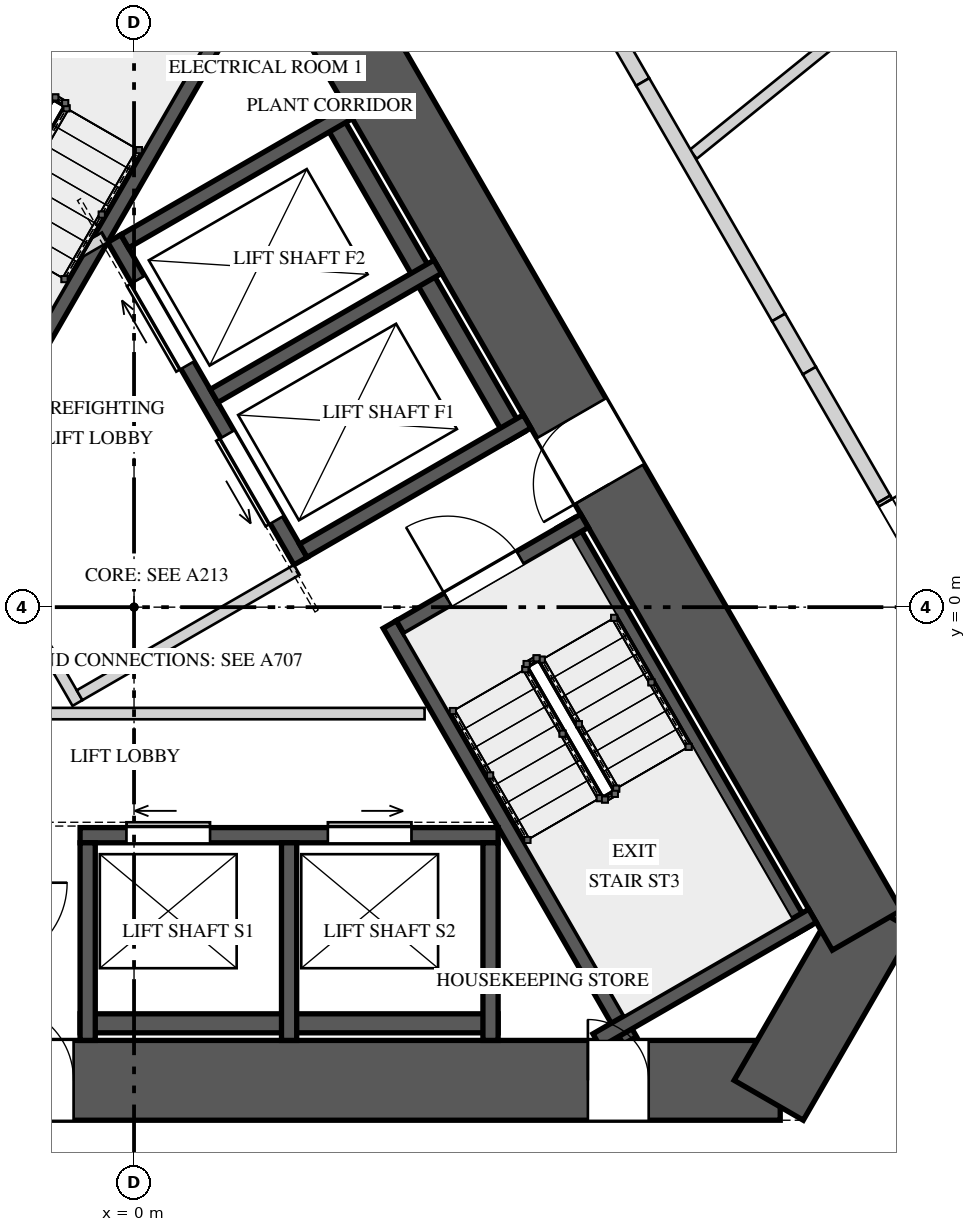
"""IFC4 building model, lengths in metres.
Left out: names, types, materials, properties, quantities, classifications, styles, units other than length and angle.
Written with IfcOpenShell. Run it as: python <this file> out.ifc"""

import sys

from ifc_helpers import new_model, si_unit, direction, frame, frame_2d, origin, place, context, subcontext, project, spatial, polyline, rectangle, outline, extrude, element, fill, save


model = new_model("IFC4")
c1 = context("Model", 3, precision=1e-05, world=origin(), true_north=direction((0.0, 1.0)))
c2 = subcontext(c1, "Body", "Model", "MODEL_VIEW")
j1 = project(units=[si_unit("LENGTHUNIT", "METRE"), si_unit("PLANEANGLEUNIT", "RADIAN")], contexts=[c1])
p1 = place(None, origin())
s1 = spatial("IfcSite", under=j1, at=p1, CompositionType="ELEMENT")
p2 = place(p1, origin())
s2 = spatial("IfcBuilding", under=s1, at=p2, CompositionType="ELEMENT")
p3 = place(p2, frame((0.0, 0.0, 83.2)))
s3 = spatial("IfcBuildingStorey", under=s2, at=p3, CompositionType="ELEMENT", Elevation=83.2)
p4 = place(p3, frame((-1.14, 10.475, 0.0), z_axis=(0.0, 0.0, 1.0), x_axis=(-0.499985955615, -0.866033512162, 0.0)))
e1 = element("IfcWall", 1, at=p4, inside=s3, PredefinedType="SHEAR", context=c2, shape_type="SweptSolid", body=[
    extrude(rectangle(XDim=17.003, YDim=1.05, at=frame_2d((8.501, 0.0))), origin(), (0.0, 0.0, 1.0), 5.2),
])
p5 = place(p4, frame((6.707, 0.0, 0.0)))
e2 = element("IfcOpeningElement", 2, at=p5, cuts=e1, PredefinedType="OPENING", context=c2, shape_type="SweptSolid", body=[
    extrude(rectangle(XDim=1.0, YDim=2.4, at=frame_2d((0.5, 1.2))), frame((0.0, 0.535, 0.0), z_axis=(0.0, -1.0, 0.0), x_axis=(1.0, 0.0, 0.0)), (0.0, 0.0, 1.0), 1.07),
])
p6 = place(p3, frame((-8.501, -6.225, 0.0), z_axis=(0.0, 0.0, 1.0), x_axis=(1.0, 0.0, 0.0)))
e3 = element("IfcWall", 3, at=p6, inside=s3, PredefinedType="SHEAR", context=c2, shape_type="SweptSolid", body=[
    extrude(rectangle(XDim=17.003, YDim=1.05, at=frame_2d((8.501, 0.0))), origin(), (0.0, 0.0, 1.0), 5.2),
])
p7 = place(p6, frame((6.707, 0.0, 0.0)))
e4 = element("IfcOpeningElement", 4, at=p7, cuts=e3, PredefinedType="OPENING", context=c2, shape_type="SweptSolid", body=[
    extrude(rectangle(XDim=1.0, YDim=2.4, at=frame_2d((0.5, 1.2))), frame((0.0, 0.535, 0.0), z_axis=(0.0, -1.0, 0.0), x_axis=(1.0, 0.0, 0.0)), (0.0, 0.0, 1.0), 1.07),
])
p8 = place(p6, frame((14.472, 0.0, 0.0)))
e5 = element("IfcOpeningElement", 5, at=p8, cuts=e3, PredefinedType="OPENING", context=c2, shape_type="SweptSolid", body=[
    extrude(rectangle(XDim=0.8, YDim=2.1, at=frame_2d((0.4, 1.05))), frame((0.0, 0.535, 0.0), z_axis=(0.0, -1.0, 0.0), x_axis=(1.0, 0.0, 0.0)), (0.0, 0.0, 1.0), 1.07),
])
p9 = place(p3, frame((8.35, -6.488, 0.0), z_axis=(0.0, 0.0, 1.0), x_axis=(0.499995765644, 0.866027848477, 0.0)))
e6 = element("IfcWall", 6, at=p9, inside=s3, PredefinedType="SHEAR", context=c2, shape_type="SweptSolid", body=[
    extrude(rectangle(XDim=2.887, YDim=1.05, at=frame_2d((1.443, 0.0))), origin(), (0.0, 0.0, 1.0), 5.2),
])
p10 = place(p3, frame((9.642, -4.25, 0.0), z_axis=(0.0, 0.0, 1.0), x_axis=(-0.499985955615, 0.866033512162, 0.0)))
e7 = element("IfcWall", 7, at=p10, inside=s3, PredefinedType="SHEAR", context=c2, shape_type="SweptSolid", body=[
    extrude(rectangle(XDim=17.003, YDim=1.05, at=frame_2d((8.501, 0.0))), origin(), (0.0, 0.0, 1.0), 5.2),
])
p11 = place(p10, frame((6.776, 0.0, 0.0)))
e8 = element("IfcOpeningElement", 8, at=p11, cuts=e7, PredefinedType="OPENING", context=c2, shape_type="SweptSolid", body=[
    extrude(rectangle(XDim=1.0, YDim=2.4, at=frame_2d((0.5, 1.2))), frame((0.0, 0.535, 0.0), z_axis=(0.0, -1.0, 0.0), x_axis=(1.0, 0.0, 0.0)), (0.0, 0.0, 1.0), 1.07),
])
p12 = place(p10, frame((13.967, 0.0, 0.0)))
e9 = element("IfcOpeningElement", 9, at=p12, cuts=e7, PredefinedType="OPENING", context=c2, shape_type="SweptSolid", body=[
    extrude(rectangle(XDim=0.8, YDim=2.1, at=frame_2d((0.4, 1.05))), frame((0.0, 0.535, 0.0), z_axis=(0.0, -1.0, 0.0), x_axis=(1.0, 0.0, 0.0)), (0.0, 0.0, 1.0), 1.07),
])
p13 = place(p3, frame((-0.701, 9.735, 0.0), z_axis=(0.0, 0.0, 1.0), x_axis=(-0.500026960575, -0.86600983753, 0.0)))
e10 = element("IfcWall", 10, at=p13, inside=s3, PredefinedType="SOLIDWALL", context=c2, shape_type="SweptSolid", body=[
    extrude(rectangle(XDim=6.2, YDim=0.25, at=frame_2d((3.1, 0.0))), origin(), (0.0, 0.0, 1.0), 4.85),
])
p14 = place(p3, frame((1.674, 8.5, 0.0), z_axis=(0.0, 0.0, 1.0), x_axis=(-0.499995607161, -0.866027939976, 0.0)))
e11 = element("IfcWall", 11, at=p14, inside=s3, PredefinedType="SOLIDWALL", context=c2, shape_type="SweptSolid", body=[
    extrude(rectangle(XDim=6.318, YDim=0.2, at=frame_2d((3.159, 0.0))), origin(), (0.0, 0.0, 1.0), 4.85),
])
p15 = place(p3, frame((8.781, -4.26, 0.0), z_axis=(0.0, 0.0, 1.0), x_axis=(-0.500009909098, 0.866019682689, 0.0)))
e12 = element("IfcWall", 12, at=p15, inside=s3, PredefinedType="SOLIDWALL", context=c2, shape_type="SweptSolid", body=[
    extrude(rectangle(XDim=6.2, YDim=0.25, at=frame_2d((3.1, 0.0))), origin(), (0.0, 0.0, 1.0), 4.85),
])
p16 = place(p3, frame((6.524, -5.7, 0.0), z_axis=(0.0, 0.0, 1.0), x_axis=(-0.499995607161, 0.866027939976, 0.0)))
e13 = element("IfcWall", 13, at=p16, inside=s3, PredefinedType="SOLIDWALL", context=c2, shape_type="SweptSolid", body=[
    extrude(rectangle(XDim=6.318, YDim=0.2, at=frame_2d((3.159, 0.0))), origin(), (0.0, 0.0, 1.0), 4.85),
])
p17 = place(p3, frame((6.087, -5.7, 0.0), z_axis=(0.0, 0.0, 1.0), x_axis=(0.866006986733, 0.500031897912, 0.0)))
e14 = element("IfcWall", 14, at=p17, inside=s3, PredefinedType="SOLIDWALL", context=c2, shape_type="SweptSolid", body=[
    extrude(rectangle(XDim=3.278, YDim=0.2, at=frame_2d((1.639, 0.0))), origin(), (0.0, 0.0, 1.0), 4.85),
])
p18 = place(p3, frame((3.501, -0.265, 0.0), z_axis=(0.0, 0.0, 1.0), x_axis=(0.866034573852, 0.49998411664, 0.0)))
e15 = element("IfcWall", 15, at=p18, inside=s3, PredefinedType="SOLIDWALL", context=c2, shape_type="SweptSolid", body=[
    extrude(rectangle(XDim=2.8, YDim=0.2, at=frame_2d((1.4, 0.0))), origin(), (0.0, 0.0, 1.0), 4.85),
])
p19 = place(p18, frame((0.725, 0.0, 0.0)))
e16 = element("IfcOpeningElement", 16, at=p19, cuts=e15, PredefinedType="OPENING", context=c2, shape_type="SweptSolid", body=[
    extrude(rectangle(XDim=1.1, YDim=2.4, at=frame_2d((0.55, 1.2))), frame((0.0, 0.11, 0.0), z_axis=(0.0, -1.0, 0.0), x_axis=(1.0, 0.0, 0.0)), (0.0, 0.0, 1.0), 0.22),
])
p20 = place(p3, frame((-0.71, -3.0, 0.0), z_axis=(0.0, 0.0, 1.0), x_axis=(1.0, 0.0, 0.0)))
e17 = element("IfcWall", 17, at=p20, inside=s3, PredefinedType="SOLIDWALL", context=c2, shape_type="SweptSolid", body=[
    extrude(rectangle(XDim=5.5, YDim=0.2, at=frame_2d((2.75, 0.0))), origin(), (0.0, 0.0, 1.0), 4.85),
])
p21 = place(p20, frame((0.61, 0.0, 0.0)))
e18 = element("IfcOpeningElement", 18, at=p21, cuts=e17, PredefinedType="OPENING", context=c2, shape_type="SweptSolid", body=[
    extrude(rectangle(XDim=1.1, YDim=2.1, at=frame_2d((0.55, 1.05))), frame((0.0, 0.11, 0.0), z_axis=(0.0, -1.0, 0.0), x_axis=(1.0, 0.0, 0.0)), (0.0, 0.0, 1.0), 0.22),
])
p22 = place(p20, frame((3.26, 0.0, 0.0)))
e19 = element("IfcOpeningElement", 19, at=p22, cuts=e17, PredefinedType="OPENING", context=c2, shape_type="SweptSolid", body=[
    extrude(rectangle(XDim=1.1, YDim=2.1, at=frame_2d((0.55, 1.05))), frame((0.0, 0.11, 0.0), z_axis=(0.0, -1.0, 0.0), x_axis=(1.0, 0.0, 0.0)), (0.0, 0.0, 1.0), 0.22),
])
p23 = place(p3, frame((-0.71, -5.475, 0.0), z_axis=(0.0, 0.0, 1.0), x_axis=(1.0, 0.0, 0.0)))
e20 = element("IfcWall", 20, at=p23, inside=s3, PredefinedType="SOLIDWALL", context=c2, shape_type="SweptSolid", body=[
    extrude(rectangle(XDim=5.5, YDim=0.25, at=frame_2d((2.75, 0.0))), origin(), (0.0, 0.0, 1.0), 4.85),
])
for number, where, z_axis, x_axis in (
    (21, (-0.61, -3.1, 0.0), (0.0, 0.0, 1.0), (0.0, -1.0, 0.0)),
    (22, (2.04, -3.1, 0.0), (0.0, 0.0, 1.0), (0.0, -1.0, 0.0)),
    (23, (4.69, -3.1, 0.0), (0.0, 0.0, 1.0), (0.0, -1.0, 0.0)),
):
    element("IfcWall", number, at=place(p3, frame(where, z_axis=z_axis, x_axis=x_axis)), inside=s3, PredefinedType="SOLIDWALL", context=c2, shape_type="SweptSolid", body=[
        extrude(rectangle(XDim=2.6, YDim=0.2, at=frame_2d((1.3, 0.0))), origin(), (0.0, 0.0, 1.0), 4.85),
    ])
p24 = place(p3, frame((2.19, 0.606, 0.0), z_axis=(0.0, 0.0, 1.0), x_axis=(-0.500002801628, 0.866023786258, 0.0)))
e24 = element("IfcWall", 24, at=p24, inside=s3, PredefinedType="SOLIDWALL", context=c2, shape_type="SweptSolid", body=[
    extrude(rectangle(XDim=4.9, YDim=0.2, at=frame_2d((2.45, 0.0))), origin(), (0.0, 0.0, 1.0), 4.85),
])
p25 = place(p24, frame((0.625, 0.0, 0.0)))
e25 = element("IfcOpeningElement", 25, at=p25, cuts=e24, PredefinedType="OPENING", context=c2, shape_type="SweptSolid", body=[
    extrude(rectangle(XDim=1.3, YDim=2.1, at=frame_2d((0.65, 1.05))), frame((0.0, 0.11, 0.0), z_axis=(0.0, -1.0, 0.0), x_axis=(1.0, 0.0, 0.0)), (0.0, 0.0, 1.0), 0.22),
])
p26 = place(p24, frame((2.975, 0.0, 0.0)))
e26 = element("IfcOpeningElement", 26, at=p26, cuts=e24, PredefinedType="OPENING", context=c2, shape_type="SweptSolid", body=[
    extrude(rectangle(XDim=1.3, YDim=2.1, at=frame_2d((0.65, 1.05))), frame((0.0, 0.11, 0.0), z_axis=(0.0, -1.0, 0.0), x_axis=(1.0, 0.0, 0.0)), (0.0, 0.0, 1.0), 0.22),
])
p27 = place(p3, frame((5.026, 2.244, 0.0), z_axis=(0.0, 0.0, 1.0), x_axis=(-0.500002801628, 0.866023786258, 0.0)))
e27 = element("IfcWall", 27, at=p27, inside=s3, PredefinedType="SOLIDWALL", context=c2, shape_type="SweptSolid", body=[
    extrude(rectangle(XDim=4.9, YDim=0.25, at=frame_2d((2.45, 0.0))), origin(), (0.0, 0.0, 1.0), 4.85),
])
for number, where, z_axis, x_axis in (
    (28, (2.227, 0.743, 0.0), (0.0, 0.0, 1.0), (0.866, 0.5, 0.0)),
    (29, (1.052, 2.778, 0.0), (0.0, 0.0, 1.0), (0.866, 0.5, 0.0)),
):
    element("IfcWall", number, at=place(p3, frame(where, z_axis=z_axis, x_axis=x_axis)), inside=s3, PredefinedType="SOLIDWALL", context=c2, shape_type="SweptSolid", body=[
        extrude(rectangle(XDim=3.4, YDim=0.2, at=frame_2d((1.7, 0.0))), origin(), (0.0, 0.0, 1.0), 4.85),
    ])
p28 = place(p3, frame((-0.123, 4.813, 0.0), z_axis=(0.0, 0.0, 1.0), x_axis=(0.866020560687, 0.500008388397, 0.0)))
e30 = element("IfcWall", 30, at=p28, inside=s3, PredefinedType="SOLIDWALL", context=c2, shape_type="SweptSolid", body=[
    extrude(rectangle(XDim=3.4, YDim=0.2, at=frame_2d((1.7, 0.0))), origin(), (0.0, 0.0, 1.0), 4.85),
])
p29 = place(p3, frame((-0.744, -1.261, 0.0), z_axis=(0.0, 0.0, 1.0), x_axis=(-0.500004234368, 0.866022959057, 0.0)))
e31 = element("IfcWall", 31, at=p29, inside=s3, PredefinedType="PARTITIONING", context=c2, shape_type="SweptSolid", body=[
    extrude(rectangle(XDim=3.125, YDim=0.15, at=frame_2d((1.562, 0.0))), origin(), (0.0, 0.0, 1.0), 4.85),
])
p30 = place(p29, frame((1.05, 0.0, 0.0)))
e32 = element("IfcOpeningElement", 32, at=p30, cuts=e31, PredefinedType="OPENING", context=c2, shape_type="SweptSolid", body=[
    extrude(rectangle(XDim=1.1, YDim=2.4, at=frame_2d((0.55, 1.2))), frame((0.0, 0.085, 0.0), z_axis=(0.0, -1.0, 0.0), x_axis=(1.0, 0.0, 0.0)), (0.0, 0.0, 1.0), 0.17),
])
p31 = place(p3, frame((-0.717, -1.159, 0.0), z_axis=(0.0, 0.0, 1.0), x_axis=(0.866008176907, 0.50002983664, 0.0)))
e33 = element("IfcWall", 33, at=p31, inside=s3, PredefinedType="PARTITIONING", context=c2, shape_type="SweptSolid", body=[
    extrude(rectangle(XDim=3.3, YDim=0.15, at=frame_2d((1.65, 0.0))), origin(), (0.0, 0.0, 1.0), 4.85),
])
p32 = place(p3, frame((-1.51, 4.215, 0.0), z_axis=(0.0, 0.0, 1.0), x_axis=(0.866085525409, 0.49989585183, 0.0)))
e34 = element("IfcWall", 34, at=p32, inside=s3, PredefinedType="PARTITIONING", context=c2, shape_type="SweptSolid", body=[
    extrude(rectangle(XDim=1.3, YDim=0.15, at=frame_2d((0.65, 0.0))), origin(), (0.0, 0.0, 1.0), 4.85),
])
p33 = place(p3, frame((-4.053, -1.4, 0.0), z_axis=(0.0, 0.0, 1.0), x_axis=(1.0, 0.0, 0.0)))
e35 = element("IfcWall", 35, at=p33, inside=s3, PredefinedType="PARTITIONING", context=c2, shape_type="SweptSolid", body=[
    extrude(rectangle(XDim=7.876, YDim=0.15, at=frame_2d((3.938, 0.0))), origin(), (0.0, 0.0, 1.0), 4.85),
])
p34 = place(p3, frame((7.357, 5.958, 0.0), z_axis=(0.0, 0.0, 1.0), x_axis=(0.777142948643, 0.629324111547, 0.0)))
e36 = element("IfcWall", 36, at=p34, inside=s3, PredefinedType="PARTITIONING", context=c2, shape_type="SweptSolid", body=[
    extrude(rectangle(XDim=8.033, YDim=0.15, at=frame_2d((4.017, 0.0))), origin(), (0.0, 0.0, 1.0), 4.85),
])
p35 = place(p3, frame((6.324, 7.547, 0.0), z_axis=(0.0, 0.0, 1.0), x_axis=(0.499885169746, -0.866091690913, 0.0)))
e37 = element("IfcWall", 37, at=p35, inside=s3, PredefinedType="SOLIDWALL", context=c2, shape_type="SweptSolid", body=[
    extrude(rectangle(XDim=0.736, YDim=0.2, at=frame_2d((0.368, 0.0))), origin(), (0.0, 0.0, 1.0), 4.15),
])
p36 = place(p3, frame((6.692, 6.909, 0.0), z_axis=(0.0, 0.0, 1.0), x_axis=(0.500029679218, -0.866008267802, 0.0)))
e38 = element("IfcWall", 38, at=p36, inside=s3, PredefinedType="SOLIDWALL", context=c2, shape_type="SweptSolid", body=[
    extrude(rectangle(XDim=3.577, YDim=0.2, at=frame_2d((1.789, 0.0))), origin(), (0.0, 0.0, 1.0), 4.85),
])
p37 = place(p3, frame((8.48, 3.812, 0.0), z_axis=(0.0, 0.0, 1.0), x_axis=(0.499809598504, -0.866135304236, 0.0)))
e39 = element("IfcWall", 39, at=p37, inside=s3, PredefinedType="SOLIDWALL", context=c2, shape_type="SweptSolid", body=[
    extrude(rectangle(XDim=0.808, YDim=0.2, at=frame_2d((0.404, 0.0))), origin(), (0.0, 0.0, 1.0), 3.95),
])
p38 = place(p3, frame((8.885, 3.111, 0.0), z_axis=(0.0, 0.0, 1.0), x_axis=(0.500061185694, -0.865990075325, 0.0)))
e40 = element("IfcWall", 40, at=p38, inside=s3, PredefinedType="SOLIDWALL", context=c2, shape_type="SweptSolid", body=[
    extrude(rectangle(XDim=1.955, YDim=0.2, at=frame_2d((0.978, 0.0))), origin(), (0.0, 0.0, 1.0), 4.85),
])
p39 = place(p3, frame((9.862, 1.418, 0.0), z_axis=(0.0, 0.0, 1.0), x_axis=(0.500011588718, -0.866018712932, 0.0)))
e41 = element("IfcWall", 41, at=p39, inside=s3, PredefinedType="SOLIDWALL", context=c2, shape_type="SweptSolid", body=[
    extrude(outline(polyline([(0.0, 0.0), (1.438, 0.0), (1.437, 3.75), (0.431, 3.75), (0.431, 4.85), (0.0, 4.85), (0.0, 0.0)])), frame((0.0, 0.1, 0.0), z_axis=(0.0, -1.0, 0.0), x_axis=(1.0, 0.0, 0.0)), (0.0, 0.0, 1.0), 0.2),
])
p40 = place(p39, frame((0.05, 0.0, 0.0)))
e42 = element("IfcOpeningElement", 42, at=p40, cuts=e41, PredefinedType="OPENING", context=c2, shape_type="SweptSolid", body=[
    extrude(rectangle(XDim=1.1, YDim=2.2, at=frame_2d((0.55, 1.1))), frame((0.0, 0.11, 0.0), z_axis=(0.0, -1.0, 0.0), x_axis=(1.0, 0.0, 0.0)), (0.0, 0.0, 1.0), 0.22),
])
p41 = place(p19, origin())
e43 = element("IfcDoor", 43, at=p41, inside=s3, OperationType="SINGLE_SWING_RIGHT", PredefinedType="DOOR", context=c2, shape_type="SweptSolid", body=[
    extrude(rectangle(XDim=1.1, YDim=2.4, at=frame_2d((0.55, 1.2))), frame((0.0, 0.025, 0.0), z_axis=(0.0, -1.0, 0.0), x_axis=(1.0, 0.0, 0.0)), (0.0, 0.0, 1.0), 0.05),
])
fill(e16, e43)
p42 = place(p21, origin())
e44 = element("IfcDoor", 44, at=p42, inside=s3, OperationType="SLIDING_TO_LEFT", PredefinedType="DOOR", context=c2, shape_type="SweptSolid", body=[
    extrude(rectangle(XDim=1.1, YDim=2.1, at=frame_2d((0.55, 1.05))), frame((0.0, 0.025, 0.0), z_axis=(0.0, -1.0, 0.0), x_axis=(1.0, 0.0, 0.0)), (0.0, 0.0, 1.0), 0.05),
])
fill(e18, e44)
p43 = place(p22, origin())
e45 = element("IfcDoor", 45, at=p43, inside=s3, OperationType="SLIDING_TO_RIGHT", PredefinedType="DOOR", context=c2, shape_type="SweptSolid", body=[
    extrude(rectangle(XDim=1.1, YDim=2.1, at=frame_2d((0.55, 1.05))), frame((0.0, 0.025, 0.0), z_axis=(0.0, -1.0, 0.0), x_axis=(1.0, 0.0, 0.0)), (0.0, 0.0, 1.0), 0.05),
])
fill(e19, e45)
p44 = place(p25, origin())
e46 = element("IfcDoor", 46, at=p44, inside=s3, OperationType="SLIDING_TO_LEFT", PredefinedType="DOOR", context=c2, shape_type="SweptSolid", body=[
    extrude(rectangle(XDim=1.3, YDim=2.1, at=frame_2d((0.65, 1.05))), frame((0.0, 0.025, 0.0), z_axis=(0.0, -1.0, 0.0), x_axis=(1.0, 0.0, 0.0)), (0.0, 0.0, 1.0), 0.05),
])
fill(e25, e46)
p45 = place(p26, origin())
e47 = element("IfcDoor", 47, at=p45, inside=s3, OperationType="SLIDING_TO_RIGHT", PredefinedType="DOOR", context=c2, shape_type="SweptSolid", body=[
    extrude(rectangle(XDim=1.3, YDim=2.1, at=frame_2d((0.65, 1.05))), frame((0.0, 0.025, 0.0), z_axis=(0.0, -1.0, 0.0), x_axis=(1.0, 0.0, 0.0)), (0.0, 0.0, 1.0), 0.05),
])
fill(e26, e47)
p46 = place(p7, origin())
e48 = element("IfcDoor", 48, at=p46, inside=s3, OperationType="SINGLE_SWING_LEFT", PredefinedType="DOOR", context=c2, shape_type="SweptSolid", body=[
    extrude(rectangle(XDim=1.0, YDim=2.4, at=frame_2d((0.5, 1.2))), frame((0.0, 0.025, 0.0), z_axis=(0.0, -1.0, 0.0), x_axis=(1.0, 0.0, 0.0)), (0.0, 0.0, 1.0), 0.05),
])
fill(e4, e48)
p47 = place(p11, origin())
e49 = element("IfcDoor", 49, at=p47, inside=s3, OperationType="SINGLE_SWING_RIGHT", PredefinedType="DOOR", context=c2, shape_type="SweptSolid", body=[
    extrude(rectangle(XDim=1.0, YDim=2.4, at=frame_2d((0.5, 1.2))), frame((0.0, 0.025, 0.0), z_axis=(0.0, -1.0, 0.0), x_axis=(1.0, 0.0, 0.0)), (0.0, 0.0, 1.0), 0.05),
])
fill(e8, e49)
p48 = place(p8, origin())
e50 = element("IfcDoor", 50, at=p48, inside=s3, OperationType="SINGLE_SWING_LEFT", PredefinedType="DOOR", context=c2, shape_type="SweptSolid", body=[
    extrude(rectangle(XDim=0.8, YDim=2.1, at=frame_2d((0.4, 1.05))), frame((0.0, 0.025, 0.0), z_axis=(0.0, -1.0, 0.0), x_axis=(1.0, 0.0, 0.0)), (0.0, 0.0, 1.0), 0.05),
])
fill(e5, e50)
p49 = place(p40, origin())
e51 = element("IfcDoor", 51, at=p49, inside=s3, OperationType="SINGLE_SWING_LEFT", PredefinedType="DOOR", context=c2, shape_type="SweptSolid", body=[
    extrude(rectangle(XDim=1.1, YDim=2.2, at=frame_2d((0.55, 1.1))), frame((0.0, 0.025, 0.0), z_axis=(0.0, -1.0, 0.0), x_axis=(1.0, 0.0, 0.0)), (0.0, 0.0, 1.0), 0.05),
])
fill(e42, e51)
save(model, sys.argv[1])
